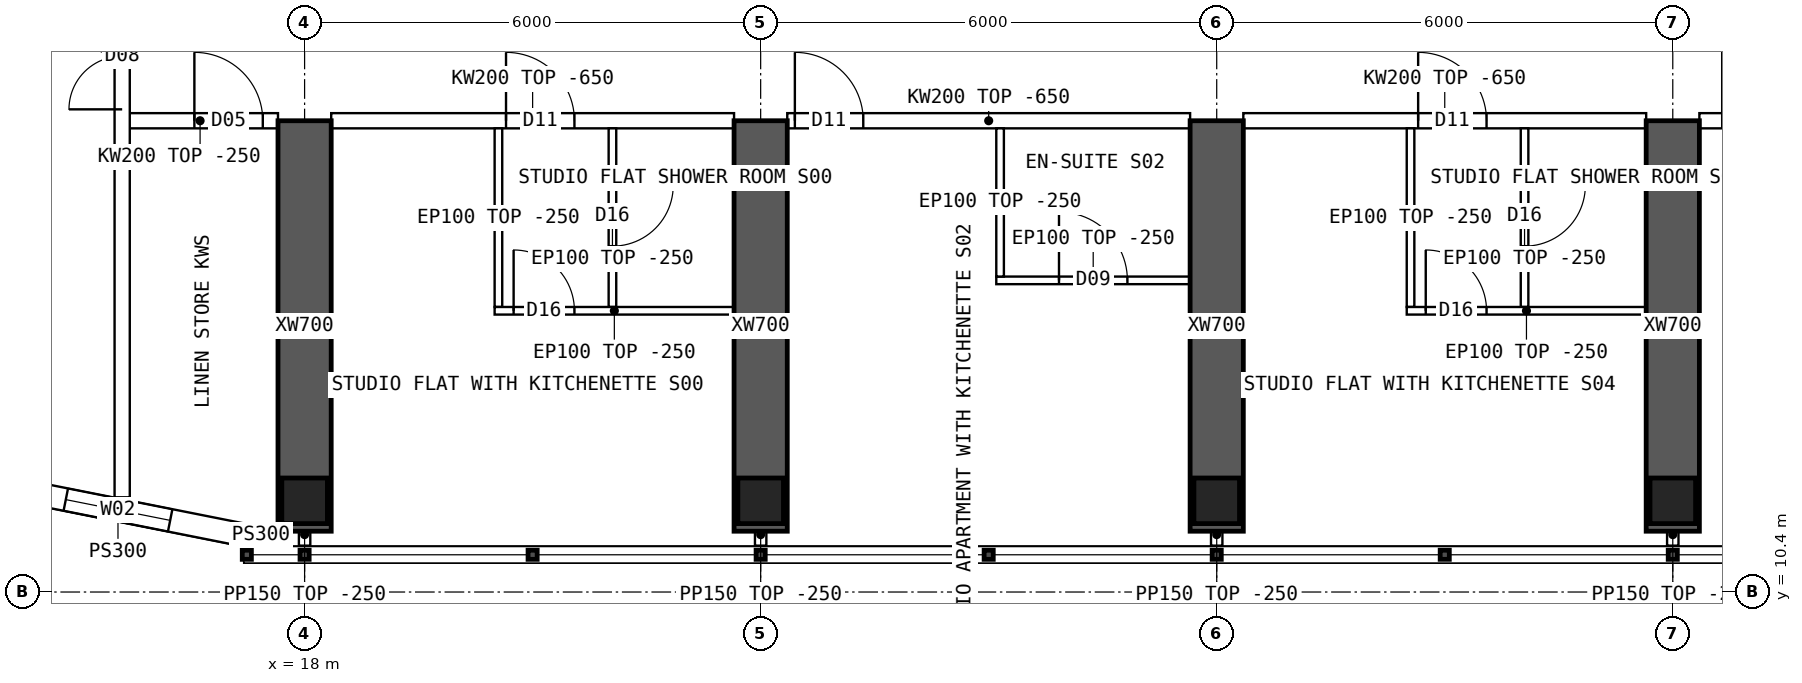
"""IFC4 building model, lengths in metres.
Left out: names, types, materials, properties, quantities, classifications, styles, units other than length and angle.
Written with IfcOpenShell. Run it as: python <this file> out.ifc"""

import sys

from ifc_helpers import new_model, si_unit, direction, frame, frame_2d, origin, origin_2d, place, context, subcontext, project, spatial, polyline, rectangle, hollow_rectangle, outline, extrude, element, fill, save


model = new_model("IFC4")
c1 = context("Model", 3, precision=1e-05, world=origin(), true_north=direction((0.0, 1.0)))
c2 = subcontext(c1, "Body", "Model", "MODEL_VIEW")
j1 = project(units=[si_unit("LENGTHUNIT", "METRE"), si_unit("PLANEANGLEUNIT", "RADIAN")], contexts=[c1])
p1 = place(None, origin())
s1 = spatial("IfcSite", under=j1, at=p1, CompositionType="ELEMENT")
p2 = place(p1, origin())
s2 = spatial("IfcBuilding", under=s1, at=p2, CompositionType="ELEMENT")
p3 = place(p2, frame((0.0, 0.0, 231.55)))
s3 = spatial("IfcBuildingStorey", under=s2, at=p3, CompositionType="ELEMENT", Elevation=231.55)
for number, where, z_axis, x_axis in (
    (1, (18.0, 11.6, 0.0), (0.0, 0.0, 1.0), (1.0, 0.0, 0.0)),
    (2, (24.0, 11.6, 0.0), (0.0, 0.0, 1.0), (1.0, 0.0, 0.0)),
    (3, (30.0, 11.6, 0.0), (0.0, 0.0, 1.0), (1.0, 0.0, 0.0)),
    (4, (36.0, 11.6, 0.0), (0.0, 0.0, 1.0), (1.0, 0.0, 0.0)),
):
    element("IfcColumn", number, at=place(p3, frame(where, z_axis=z_axis, x_axis=x_axis)), inside=s3, PredefinedType="COLUMN", context=c2, shape_type="SweptSolid", body=[
        extrude(hollow_rectangle(XDim=0.6, YDim=0.6, WallThickness=0.06, at=origin_2d()), origin(), (0.0, 0.0, 1.0), 3.75),
    ])
for number, where, z_axis, x_axis in (
    (5, (18.0, 11.2, 0.0), (0.0, 0.0, 1.0), (0.0, 1.0, 0.0)),
    (6, (24.0, 11.2, 0.0), (0.0, 0.0, 1.0), (0.0, 1.0, 0.0)),
    (7, (30.0, 11.2, 0.0), (0.0, 0.0, 1.0), (0.0, 1.0, 0.0)),
    (8, (36.0, 11.2, 0.0), (0.0, 0.0, 1.0), (0.0, 1.0, 0.0)),
):
    element("IfcWall", number, at=place(p3, frame(where, z_axis=z_axis, x_axis=x_axis)), inside=s3, PredefinedType="SHEAR", context=c2, shape_type="SweptSolid", body=[
        extrude(rectangle(XDim=5.4, YDim=0.7, at=frame_2d((2.7, 0.0))), origin(), (0.0, 0.0, 1.0), 3.75),
    ])
p4 = place(p3, frame((13.89, 11.808, 0.0), z_axis=(0.0, 0.0, 1.0), x_axis=(0.98078325777, -0.195100490205, 0.0)))
e9 = element("IfcWall", 9, at=p4, inside=s3, PredefinedType="SOLIDWALL", context=c2, shape_type="SweptSolid", body=[
    extrude(outline(polyline([(-0.03, -0.15), (3.405, -0.15), (3.345, 0.15), (0.03, 0.15), (-0.03, -0.15)])), origin(), (0.0, 0.0, 1.0), 3.5),
])
p5 = place(p4, frame((0.988, 0.0, 0.9)))
e10 = element("IfcOpeningElement", 10, at=p5, cuts=e9, PredefinedType="OPENING", context=c2, shape_type="SweptSolid", body=[
    extrude(rectangle(XDim=1.4, YDim=1.8, at=frame_2d((0.7, 0.9))), frame((0.0, 0.16, 0.0), z_axis=(0.0, -1.0, 0.0), x_axis=(1.0, 0.0, 0.0)), (0.0, 0.0, 1.0), 0.32),
])
p6 = place(p3, frame((17.2, 11.15, 0.0), z_axis=(0.0, 0.0, 1.0), x_axis=(1.0, 0.0, 0.0)))
e11 = element("IfcWall", 11, at=p6, inside=s3, PredefinedType="SOLIDWALL", context=c2, shape_type="SweptSolid", body=[
    extrude(rectangle(XDim=0.45, YDim=0.3, at=frame_2d((0.225, 0.0))), origin(), (0.0, 0.0, 1.0), 3.5),
])
p7 = place(p3, frame((15.6, 16.6, 0.0), z_axis=(0.0, 0.0, 1.0), x_axis=(1.0, 0.0, 0.0)))
e12 = element("IfcWall", 12, at=p7, inside=s3, PredefinedType="SOLIDWALL", context=c2, shape_type="SweptSolid", body=[
    extrude(rectangle(XDim=2.05, YDim=0.2, at=frame_2d((1.025, 0.0))), origin(), (0.0, 0.0, 1.0), 3.5),
])
p8 = place(p7, frame((0.95, 0.0, 0.0)))
e13 = element("IfcOpeningElement", 13, at=p8, cuts=e12, PredefinedType="OPENING", context=c2, shape_type="SweptSolid", body=[
    extrude(rectangle(XDim=0.9, YDim=2.1, at=frame_2d((0.45, 1.05))), frame((0.0, 0.11, 0.0), z_axis=(0.0, -1.0, 0.0), x_axis=(1.0, 0.0, 0.0)), (0.0, 0.0, 1.0), 0.22),
])
p9 = place(p3, frame((18.35, 16.6, 0.0), z_axis=(0.0, 0.0, 1.0), x_axis=(1.0, 0.0, 0.0)))
e14 = element("IfcWall", 14, at=p9, inside=s3, PredefinedType="SOLIDWALL", context=c2, shape_type="SweptSolid", body=[
    extrude(outline(polyline([(0.0, 0.0), (5.3, 0.0), (5.3, 3.1), (0.0, 3.1), (0.0, 0.0)])), frame((0.0, 0.1, 0.0), z_axis=(0.0, -1.0, 0.0), x_axis=(1.0, 0.0, 0.0)), (0.0, 0.0, 1.0), 0.2),
])
p10 = place(p9, frame((2.3, 0.0, 0.0)))
e15 = element("IfcOpeningElement", 15, at=p10, cuts=e14, PredefinedType="OPENING", context=c2, shape_type="SweptSolid", body=[
    extrude(rectangle(XDim=0.9, YDim=2.1, at=frame_2d((0.45, 1.05))), frame((0.0, 0.11, 0.0), z_axis=(0.0, -1.0, 0.0), x_axis=(1.0, 0.0, 0.0)), (0.0, 0.0, 1.0), 0.22),
])
p11 = place(p3, frame((24.35, 16.6, 0.0), z_axis=(0.0, 0.0, 1.0), x_axis=(1.0, 0.0, 0.0)))
e16 = element("IfcWall", 16, at=p11, inside=s3, PredefinedType="SOLIDWALL", context=c2, shape_type="SweptSolid", body=[
    extrude(outline(polyline([(0.0, 0.0), (5.3, 0.0), (5.3, 3.1), (0.0, 3.1), (0.0, 0.0)])), frame((0.0, 0.1, 0.0), z_axis=(0.0, -1.0, 0.0), x_axis=(1.0, 0.0, 0.0)), (0.0, 0.0, 1.0), 0.2),
])
p12 = place(p11, frame((0.1, 0.0, 0.0)))
e17 = element("IfcOpeningElement", 17, at=p12, cuts=e16, PredefinedType="OPENING", context=c2, shape_type="SweptSolid", body=[
    extrude(rectangle(XDim=0.9, YDim=2.1, at=frame_2d((0.45, 1.05))), frame((0.0, 0.11, 0.0), z_axis=(0.0, -1.0, 0.0), x_axis=(1.0, 0.0, 0.0)), (0.0, 0.0, 1.0), 0.22),
])
p13 = place(p3, frame((30.35, 16.6, 0.0), z_axis=(0.0, 0.0, 1.0), x_axis=(1.0, 0.0, 0.0)))
e18 = element("IfcWall", 18, at=p13, inside=s3, PredefinedType="SOLIDWALL", context=c2, shape_type="SweptSolid", body=[
    extrude(outline(polyline([(0.0, 0.0), (5.3, 0.0), (5.3, 3.1), (0.0, 3.1), (0.0, 0.0)])), frame((0.0, 0.1, 0.0), z_axis=(0.0, -1.0, 0.0), x_axis=(1.0, 0.0, 0.0)), (0.0, 0.0, 1.0), 0.2),
])
p14 = place(p13, frame((2.3, 0.0, 0.0)))
e19 = element("IfcOpeningElement", 19, at=p14, cuts=e18, PredefinedType="OPENING", context=c2, shape_type="SweptSolid", body=[
    extrude(rectangle(XDim=0.9, YDim=2.1, at=frame_2d((0.45, 1.05))), frame((0.0, 0.11, 0.0), z_axis=(0.0, -1.0, 0.0), x_axis=(1.0, 0.0, 0.0)), (0.0, 0.0, 1.0), 0.22),
])
p15 = place(p3, frame((36.35, 16.6, 0.0), z_axis=(0.0, 0.0, 1.0), x_axis=(1.0, 0.0, 0.0)))
e20 = element("IfcWall", 20, at=p15, inside=s3, PredefinedType="SOLIDWALL", context=c2, shape_type="SweptSolid", body=[
    extrude(outline(polyline([(0.0, 0.0), (5.3, 0.0), (5.3, 3.1), (0.0, 3.1), (0.0, 0.0)])), frame((0.0, 0.1, 0.0), z_axis=(0.0, -1.0, 0.0), x_axis=(1.0, 0.0, 0.0)), (0.0, 0.0, 1.0), 0.2),
])
p16 = place(p15, frame((0.3, 0.0, 0.0)))
e21 = element("IfcOpeningElement", 21, at=p16, cuts=e20, PredefinedType="OPENING", context=c2, shape_type="SweptSolid", body=[
    extrude(rectangle(XDim=1.0, YDim=2.1, at=frame_2d((0.5, 1.05))), frame((0.0, 0.11, 0.0), z_axis=(0.0, -1.0, 0.0), x_axis=(1.0, 0.0, 0.0)), (0.0, 0.0, 1.0), 0.22),
])
p17 = place(p3, frame((23.65, 14.1, 0.0), z_axis=(0.0, 0.0, 1.0), x_axis=(-1.0, 0.0, 0.0)))
e22 = element("IfcWall", 22, at=p17, inside=s3, PredefinedType="PARTITIONING", context=c2, shape_type="SweptSolid", body=[
    extrude(rectangle(XDim=3.15, YDim=0.1, at=frame_2d((1.575, 0.0))), origin(), (0.0, 0.0, 1.0), 3.5),
])
p18 = place(p17, frame((2.1, 0.0, 0.0)))
e23 = element("IfcOpeningElement", 23, at=p18, cuts=e22, PredefinedType="OPENING", context=c2, shape_type="SweptSolid", body=[
    extrude(rectangle(XDim=0.8, YDim=2.1, at=frame_2d((0.4, 1.05))), frame((0.0, 0.06, 0.0), z_axis=(0.0, -1.0, 0.0), x_axis=(1.0, 0.0, 0.0)), (0.0, 0.0, 1.0), 0.12),
])
p19 = place(p3, frame((20.55, 14.15, 0.0), z_axis=(0.0, 0.0, 1.0), x_axis=(0.0, 1.0, 0.0)))
e24 = element("IfcWall", 24, at=p19, inside=s3, PredefinedType="PARTITIONING", context=c2, shape_type="SweptSolid", body=[
    extrude(outline(polyline([(0.0, 0.0), (2.35, 0.0), (2.35, 3.1), (2.302, 3.1), (2.3, 3.5), (0.0, 3.5), (0.0, 0.0)])), frame((0.0, 0.05, 0.0), z_axis=(0.0, -1.0, 0.0), x_axis=(1.0, 0.0, 0.0)), (0.0, 0.0, 1.0), 0.1),
])
p20 = place(p3, frame((22.05, 14.15, 0.0), z_axis=(0.0, 0.0, 1.0), x_axis=(0.0, 1.0, 0.0)))
e25 = element("IfcWall", 25, at=p20, inside=s3, PredefinedType="PARTITIONING", context=c2, shape_type="SweptSolid", body=[
    extrude(outline(polyline([(0.0, 0.0), (2.35, 0.0), (2.35, 3.1), (2.302, 3.1), (2.3, 3.5), (0.0, 3.5), (0.0, 0.0)])), frame((0.0, 0.05, 0.0), z_axis=(0.0, -1.0, 0.0), x_axis=(1.0, 0.0, 0.0)), (0.0, 0.0, 1.0), 0.1),
])
p21 = place(p20, frame((0.8, 0.0, 0.0)))
e26 = element("IfcOpeningElement", 26, at=p21, cuts=e25, PredefinedType="OPENING", context=c2, shape_type="SweptSolid", body=[
    extrude(rectangle(XDim=0.8, YDim=2.1, at=frame_2d((0.4, 1.05))), frame((0.0, 0.06, 0.0), z_axis=(0.0, -1.0, 0.0), x_axis=(1.0, 0.0, 0.0)), (0.0, 0.0, 1.0), 0.12),
])
p22 = place(p3, frame((29.65, 14.5, 0.0), z_axis=(0.0, 0.0, 1.0), x_axis=(-1.0, 0.0, 0.0)))
e27 = element("IfcWall", 27, at=p22, inside=s3, PredefinedType="PARTITIONING", context=c2, shape_type="SweptSolid", body=[
    extrude(rectangle(XDim=2.55, YDim=0.1, at=frame_2d((1.275, 0.0))), origin(), (0.0, 0.0, 1.0), 3.5),
])
p23 = place(p22, frame((0.825, 0.0, 0.0)))
e28 = element("IfcOpeningElement", 28, at=p23, cuts=e27, PredefinedType="OPENING", context=c2, shape_type="SweptSolid", body=[
    extrude(rectangle(XDim=0.9, YDim=2.1, at=frame_2d((0.45, 1.05))), frame((0.0, 0.06, 0.0), z_axis=(0.0, -1.0, 0.0), x_axis=(1.0, 0.0, 0.0)), (0.0, 0.0, 1.0), 0.12),
])
p24 = place(p3, frame((27.15, 14.55, 0.0), z_axis=(0.0, 0.0, 1.0), x_axis=(0.0, 1.0, 0.0)))
e29 = element("IfcWall", 29, at=p24, inside=s3, PredefinedType="PARTITIONING", context=c2, shape_type="SweptSolid", body=[
    extrude(outline(polyline([(0.0, 0.0), (1.95, 0.0), (1.95, 3.1), (1.902, 3.1), (1.9, 3.5), (0.0, 3.5), (0.0, 0.0)])), frame((0.0, 0.05, 0.0), z_axis=(0.0, -1.0, 0.0), x_axis=(1.0, 0.0, 0.0)), (0.0, 0.0, 1.0), 0.1),
])
p25 = place(p3, frame((35.65, 14.1, 0.0), z_axis=(0.0, 0.0, 1.0), x_axis=(-1.0, 0.0, 0.0)))
e30 = element("IfcWall", 30, at=p25, inside=s3, PredefinedType="PARTITIONING", context=c2, shape_type="SweptSolid", body=[
    extrude(rectangle(XDim=3.15, YDim=0.1, at=frame_2d((1.575, 0.0))), origin(), (0.0, 0.0, 1.0), 3.5),
])
p26 = place(p25, frame((2.1, 0.0, 0.0)))
e31 = element("IfcOpeningElement", 31, at=p26, cuts=e30, PredefinedType="OPENING", context=c2, shape_type="SweptSolid", body=[
    extrude(rectangle(XDim=0.8, YDim=2.1, at=frame_2d((0.4, 1.05))), frame((0.0, 0.06, 0.0), z_axis=(0.0, -1.0, 0.0), x_axis=(1.0, 0.0, 0.0)), (0.0, 0.0, 1.0), 0.12),
])
p27 = place(p3, frame((32.55, 14.15, 0.0), z_axis=(0.0, 0.0, 1.0), x_axis=(0.0, 1.0, 0.0)))
e32 = element("IfcWall", 32, at=p27, inside=s3, PredefinedType="PARTITIONING", context=c2, shape_type="SweptSolid", body=[
    extrude(outline(polyline([(0.0, 0.0), (2.35, 0.0), (2.35, 3.1), (2.302, 3.1), (2.3, 3.5), (0.0, 3.5), (0.0, 0.0)])), frame((0.0, 0.05, 0.0), z_axis=(0.0, -1.0, 0.0), x_axis=(1.0, 0.0, 0.0)), (0.0, 0.0, 1.0), 0.1),
])
p28 = place(p3, frame((34.05, 14.15, 0.0), z_axis=(0.0, 0.0, 1.0), x_axis=(0.0, 1.0, 0.0)))
e33 = element("IfcWall", 33, at=p28, inside=s3, PredefinedType="PARTITIONING", context=c2, shape_type="SweptSolid", body=[
    extrude(outline(polyline([(0.0, 0.0), (2.35, 0.0), (2.35, 3.1), (2.302, 3.1), (2.3, 3.5), (0.0, 3.5), (0.0, 0.0)])), frame((0.0, 0.05, 0.0), z_axis=(0.0, -1.0, 0.0), x_axis=(1.0, 0.0, 0.0)), (0.0, 0.0, 1.0), 0.1),
])
p29 = place(p28, frame((0.8, 0.0, 0.0)))
e34 = element("IfcOpeningElement", 34, at=p29, cuts=e33, PredefinedType="OPENING", context=c2, shape_type="SweptSolid", body=[
    extrude(rectangle(XDim=0.8, YDim=2.1, at=frame_2d((0.4, 1.05))), frame((0.0, 0.06, 0.0), z_axis=(0.0, -1.0, 0.0), x_axis=(1.0, 0.0, 0.0)), (0.0, 0.0, 1.0), 0.12),
])
p30 = place(p3, frame((15.6, 11.646, 0.0), z_axis=(0.0, 0.0, 1.0), x_axis=(0.0, 1.0, 0.0)))
e35 = element("IfcWall", 35, at=p30, inside=s3, PredefinedType="SOLIDWALL", context=c2, shape_type="SweptSolid", body=[
    extrude(rectangle(XDim=40.708, YDim=0.2, at=frame_2d((20.354, 0.0))), origin(), (0.0, 0.0, 1.0), 3.5),
])
p31 = place(p30, frame((13.434, 0.0, 0.0)))
e36 = element("IfcOpeningElement", 36, at=p31, cuts=e35, PredefinedType="OPENING", context=c2, shape_type="SweptSolid", body=[
    extrude(rectangle(XDim=1.2, YDim=2.1, at=frame_2d((0.6, 1.05))), frame((0.0, 0.11, 0.0), z_axis=(0.0, -1.0, 0.0), x_axis=(1.0, 0.0, 0.0)), (0.0, 0.0, 1.0), 0.22),
])
p32 = place(p30, frame((5.104, 0.0, 0.0)))
e37 = element("IfcOpeningElement", 37, at=p32, cuts=e35, PredefinedType="OPENING", context=c2, shape_type="SweptSolid", body=[
    extrude(rectangle(XDim=1.4, YDim=2.1, at=frame_2d((0.7, 1.05))), frame((0.0, 0.11, 0.0), z_axis=(0.0, -1.0, 0.0), x_axis=(1.0, 0.0, 0.0)), (0.0, 0.0, 1.0), 0.22),
])
p33 = place(p30, frame((34.104, 0.0, 0.0)))
e38 = element("IfcOpeningElement", 38, at=p33, cuts=e35, PredefinedType="OPENING", context=c2, shape_type="SweptSolid", body=[
    extrude(rectangle(XDim=1.4, YDim=2.1, at=frame_2d((0.7, 1.05))), frame((0.0, 0.11, 0.0), z_axis=(0.0, -1.0, 0.0), x_axis=(1.0, 0.0, 0.0)), (0.0, 0.0, 1.0), 0.22),
])
for number, where, z_axis, x_axis in (
    (39, (18.0, 11.3, 0.0), (0.0, 0.0, 1.0), (0.0, -1.0, 0.0)),
    (40, (24.0, 11.3, 0.0), (0.0, 0.0, 1.0), (0.0, -1.0, 0.0)),
    (41, (30.0, 11.3, 0.0), (0.0, 0.0, 1.0), (0.0, -1.0, 0.0)),
    (42, (36.0, 11.3, 0.0), (0.0, 0.0, 1.0), (0.0, -1.0, 0.0)),
):
    element("IfcWall", number, at=place(p3, frame(where, z_axis=z_axis, x_axis=x_axis)), inside=s3, PredefinedType="PARTITIONING", context=c2, shape_type="SweptSolid", body=[
        extrude(rectangle(XDim=0.29, YDim=0.15, at=frame_2d((0.145, 0.0))), origin(), (0.0, 0.0, 1.0), 3.5),
    ])
p34 = place(p5, origin())
e43 = element("IfcWindow", 43, at=p34, inside=s3, PartitioningType="SINGLE_PANEL", PredefinedType="WINDOW", context=c2, shape_type="SweptSolid", body=[
    extrude(rectangle(XDim=1.4, YDim=1.8, at=frame_2d((0.7, 0.9))), frame((0.0, 0.03, 0.0), z_axis=(0.0, -1.0, 0.0), x_axis=(1.0, 0.0, 0.0)), (0.0, 0.0, 1.0), 0.06),
])
fill(e10, e43)
p35 = place(p18, origin())
e44 = element("IfcDoor", 44, at=p35, inside=s3, OperationType="SINGLE_SWING_RIGHT", PredefinedType="DOOR", context=c2, shape_type="SweptSolid", body=[
    extrude(rectangle(XDim=0.8, YDim=2.1, at=frame_2d((0.4, 1.05))), frame((0.0, 0.025, 0.0), z_axis=(0.0, -1.0, 0.0), x_axis=(1.0, 0.0, 0.0)), (0.0, 0.0, 1.0), 0.05),
])
fill(e23, e44)
p36 = place(p21, origin())
e45 = element("IfcDoor", 45, at=p36, inside=s3, OperationType="SINGLE_SWING_RIGHT", PredefinedType="DOOR", context=c2, shape_type="SweptSolid", body=[
    extrude(rectangle(XDim=0.8, YDim=2.1, at=frame_2d((0.4, 1.05))), frame((0.0, 0.025, 0.0), z_axis=(0.0, -1.0, 0.0), x_axis=(1.0, 0.0, 0.0)), (0.0, 0.0, 1.0), 0.05),
])
fill(e26, e45)
p37 = place(p10, origin())
e46 = element("IfcDoor", 46, at=p37, inside=s3, OperationType="SINGLE_SWING_LEFT", PredefinedType="DOOR", context=c2, shape_type="SweptSolid", body=[
    extrude(rectangle(XDim=0.9, YDim=2.1, at=frame_2d((0.45, 1.05))), frame((0.0, 0.025, 0.0), z_axis=(0.0, -1.0, 0.0), x_axis=(1.0, 0.0, 0.0)), (0.0, 0.0, 1.0), 0.05),
])
fill(e15, e46)
p38 = place(p23, origin())
e47 = element("IfcDoor", 47, at=p38, inside=s3, OperationType="SINGLE_SWING_RIGHT", PredefinedType="DOOR", context=c2, shape_type="SweptSolid", body=[
    extrude(rectangle(XDim=0.9, YDim=2.1, at=frame_2d((0.45, 1.05))), frame((0.0, 0.025, 0.0), z_axis=(0.0, -1.0, 0.0), x_axis=(1.0, 0.0, 0.0)), (0.0, 0.0, 1.0), 0.05),
])
fill(e28, e47)
p39 = place(p12, origin())
e48 = element("IfcDoor", 48, at=p39, inside=s3, OperationType="SINGLE_SWING_LEFT", PredefinedType="DOOR", context=c2, shape_type="SweptSolid", body=[
    extrude(rectangle(XDim=0.9, YDim=2.1, at=frame_2d((0.45, 1.05))), frame((0.0, 0.025, 0.0), z_axis=(0.0, -1.0, 0.0), x_axis=(1.0, 0.0, 0.0)), (0.0, 0.0, 1.0), 0.05),
])
fill(e17, e48)
p40 = place(p26, origin())
e49 = element("IfcDoor", 49, at=p40, inside=s3, OperationType="SINGLE_SWING_RIGHT", PredefinedType="DOOR", context=c2, shape_type="SweptSolid", body=[
    extrude(rectangle(XDim=0.8, YDim=2.1, at=frame_2d((0.4, 1.05))), frame((0.0, 0.025, 0.0), z_axis=(0.0, -1.0, 0.0), x_axis=(1.0, 0.0, 0.0)), (0.0, 0.0, 1.0), 0.05),
])
fill(e31, e49)
p41 = place(p29, origin())
e50 = element("IfcDoor", 50, at=p41, inside=s3, OperationType="SINGLE_SWING_RIGHT", PredefinedType="DOOR", context=c2, shape_type="SweptSolid", body=[
    extrude(rectangle(XDim=0.8, YDim=2.1, at=frame_2d((0.4, 1.05))), frame((0.0, 0.025, 0.0), z_axis=(0.0, -1.0, 0.0), x_axis=(1.0, 0.0, 0.0)), (0.0, 0.0, 1.0), 0.05),
])
fill(e34, e50)
p42 = place(p14, origin())
e51 = element("IfcDoor", 51, at=p42, inside=s3, OperationType="SINGLE_SWING_LEFT", PredefinedType="DOOR", context=c2, shape_type="SweptSolid", body=[
    extrude(rectangle(XDim=0.9, YDim=2.1, at=frame_2d((0.45, 1.05))), frame((0.0, 0.025, 0.0), z_axis=(0.0, -1.0, 0.0), x_axis=(1.0, 0.0, 0.0)), (0.0, 0.0, 1.0), 0.05),
])
fill(e19, e51)
p43 = place(p32, origin())
e52 = element("IfcDoor", 52, at=p43, inside=s3, OperationType="DOUBLE_DOOR_SINGLE_SWING", PredefinedType="DOOR", context=c2, shape_type="SweptSolid", body=[
    extrude(rectangle(XDim=1.4, YDim=2.1, at=frame_2d((0.7, 1.05))), frame((0.0, 0.025, 0.0), z_axis=(0.0, -1.0, 0.0), x_axis=(1.0, 0.0, 0.0)), (0.0, 0.0, 1.0), 0.05),
])
fill(e37, e52)
p44 = place(p8, origin())
e53 = element("IfcDoor", 53, at=p44, inside=s3, OperationType="SINGLE_SWING_LEFT", PredefinedType="DOOR", context=c2, shape_type="SweptSolid", body=[
    extrude(rectangle(XDim=0.9, YDim=2.1, at=frame_2d((0.45, 1.05))), frame((0.0, 0.025, 0.0), z_axis=(0.0, -1.0, 0.0), x_axis=(1.0, 0.0, 0.0)), (0.0, 0.0, 1.0), 0.05),
])
fill(e13, e53)
save(model, sys.argv[1])
